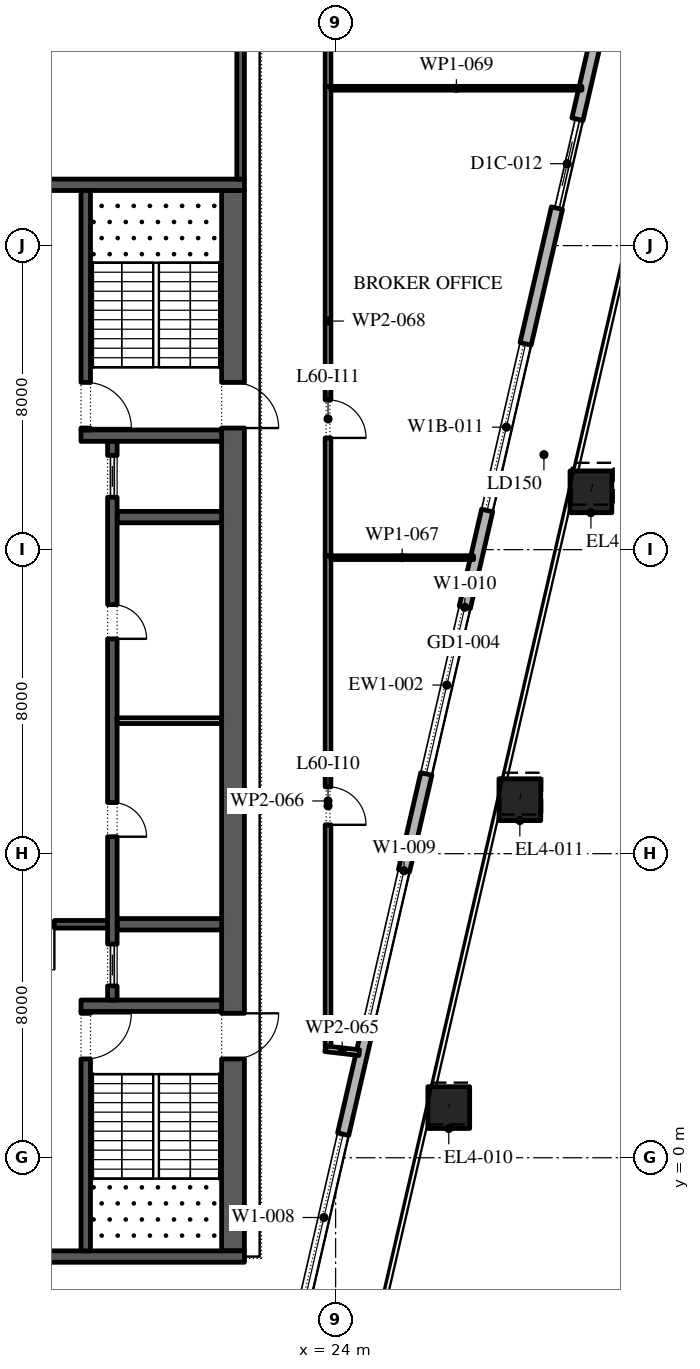
"""IFC4 building model, lengths in metres.
Left out: names, types, materials, properties, quantities, classifications, styles, units other than length and angle.
Written with IfcOpenShell. Run it as: python <this file> out.ifc"""

import sys

from ifc_helpers import new_model, si_unit, direction, frame, frame_2d, origin, origin_2d, place, context, subcontext, project, spatial, rectangle, extrude, element, fill, save


model = new_model("IFC4")
c1 = context("Model", 3, precision=1e-05, world=origin(), true_north=direction((0.0, 1.0)))
c2 = subcontext(c1, "Body", "Model", "MODEL_VIEW")
j1 = project(units=[si_unit("LENGTHUNIT", "METRE"), si_unit("PLANEANGLEUNIT", "RADIAN")], contexts=[c1])
p1 = place(None, origin())
s1 = spatial("IfcSite", under=j1, at=p1, CompositionType="ELEMENT")
p2 = place(p1, origin())
s2 = spatial("IfcBuilding", under=s1, at=p2, CompositionType="ELEMENT")
p3 = place(p2, frame((0.0, 0.0, 276.6)))
s3 = spatial("IfcBuildingStorey", under=s2, at=p3, CompositionType="ELEMENT", Elevation=276.6)
p4 = place(p3, frame((26.977, 1.32, 0.0), z_axis=(0.005810983994, 0.025277780376, 0.999663576552), x_axis=(-0.974579651079, 0.224041299099, 0.0)))
e1 = element("IfcColumn", 1, at=p4, inside=s3, PredefinedType="COLUMN", context=c2, shape_type="SweptSolid", body=[
    extrude(rectangle(XDim=1.1, YDim=1.1, at=origin_2d()), origin(), (0.0, 0.0, 1.0), 4.201),
])
p5 = place(p3, frame((28.847, 9.421, 0.0), z_axis=(0.008770884695, 0.037929719907, 0.99924191662), x_axis=(-0.974290512438, 0.225295355862, 0.0)))
e2 = element("IfcColumn", 2, at=p5, inside=s3, PredefinedType="COLUMN", context=c2, shape_type="SweptSolid", body=[
    extrude(rectangle(XDim=1.1, YDim=1.1, at=origin_2d()), origin(), (0.0, 0.0, 1.0), 4.203),
])
p6 = place(p3, frame((30.717, 17.522, 0.0), z_axis=(0.011668267153, 0.050562490995, 0.998652735462), x_axis=(-0.974391195695, 0.224859506699, 0.0)))
e3 = element("IfcColumn", 3, at=p6, inside=s3, PredefinedType="COLUMN", context=c2, shape_type="SweptSolid", body=[
    extrude(rectangle(XDim=1.1, YDim=1.1, at=origin_2d()), origin(), (0.0, 0.0, 1.0), 4.206),
])
p7 = place(p3, frame((21.359, -11.678, 0.0), z_axis=(0.0, 0.0, 1.0), x_axis=(0.224949198343, 0.974370493275, 0.0)))
e4 = element("IfcWall", 4, at=p7, inside=s3, PredefinedType="STANDARD", context=c2, shape_type="SweptSolid", body=[
    extrude(rectangle(XDim=49.5, YDim=0.3, at=frame_2d((24.75, 0.0))), origin(), (0.0, 0.0, 1.0), 4.0),
])
p8 = place(p7, frame((1.157, 0.0, 0.45)))
e5 = element("IfcOpeningElement", 5, at=p8, cuts=e4, PredefinedType="OPENING", context=c2, shape_type="SweptSolid", body=[
    extrude(rectangle(XDim=4.5, YDim=3.05, at=frame_2d((2.25, 1.525))), frame((0.0, 0.16, 0.0), z_axis=(0.0, -1.0, 0.0), x_axis=(1.0, 0.0, 0.0)), (0.0, 0.0, 1.0), 0.32),
])
p9 = place(p7, frame((8.121, 0.0, 0.45)))
e6 = element("IfcOpeningElement", 6, at=p9, cuts=e4, PredefinedType="OPENING", context=c2, shape_type="SweptSolid", body=[
    extrude(rectangle(XDim=4.5, YDim=3.05, at=frame_2d((2.25, 1.525))), frame((0.0, 0.16, 0.0), z_axis=(0.0, -1.0, 0.0), x_axis=(1.0, 0.0, 0.0)), (0.0, 0.0, 1.0), 0.32),
])
p10 = place(p7, frame((15.236, 0.0, 0.45)))
e7 = element("IfcOpeningElement", 7, at=p10, cuts=e4, PredefinedType="OPENING", context=c2, shape_type="SweptSolid", body=[
    extrude(rectangle(XDim=4.5, YDim=3.05, at=frame_2d((2.25, 1.525))), frame((0.0, 0.16, 0.0), z_axis=(0.0, -1.0, 0.0), x_axis=(1.0, 0.0, 0.0)), (0.0, 0.0, 1.0), 0.32),
])
p11 = place(p7, frame((22.35, 0.0, 0.45)))
e8 = element("IfcOpeningElement", 8, at=p11, cuts=e4, PredefinedType="OPENING", context=c2, shape_type="SweptSolid", body=[
    extrude(rectangle(XDim=4.5, YDim=3.05, at=frame_2d((2.25, 1.525))), frame((0.0, 0.16, 0.0), z_axis=(0.0, -1.0, 0.0), x_axis=(1.0, 0.0, 0.0)), (0.0, 0.0, 1.0), 0.32),
])
p12 = place(p7, frame((29.464, 0.0, 0.45)))
e9 = element("IfcOpeningElement", 9, at=p12, cuts=e4, PredefinedType="OPENING", context=c2, shape_type="SweptSolid", body=[
    extrude(rectangle(XDim=4.5, YDim=2.95, at=frame_2d((2.25, 1.475))), frame((0.0, 0.16, 0.0), z_axis=(0.0, -1.0, 0.0), x_axis=(1.0, 0.0, 0.0)), (0.0, 0.0, 1.0), 0.32),
])
p13 = place(p7, frame((37.628, 0.0, 0.0)))
e10 = element("IfcOpeningElement", 10, at=p13, cuts=e4, PredefinedType="OPENING", context=c2, shape_type="SweptSolid", body=[
    extrude(rectangle(XDim=2.4, YDim=3.325, at=frame_2d((1.2, 1.663))), frame((0.0, 0.16, 0.0), z_axis=(0.0, -1.0, 0.0), x_axis=(1.0, 0.0, 0.0)), (0.0, 0.0, 1.0), 0.32),
])
p14 = place(p7, frame((43.693, 0.0, 0.45)))
e11 = element("IfcOpeningElement", 11, at=p14, cuts=e4, PredefinedType="OPENING", context=c2, shape_type="SweptSolid", body=[
    extrude(rectangle(XDim=4.5, YDim=3.05, at=frame_2d((2.25, 1.525))), frame((0.0, 0.16, 0.0), z_axis=(0.0, -1.0, 0.0), x_axis=(1.0, 0.0, 0.0)), (0.0, 0.0, 1.0), 0.32),
])
p15 = place(p3, frame((21.3, -2.45, 0.0), z_axis=(0.0, 0.0, 1.0), x_axis=(0.0, 1.0, 0.0)))
e12 = element("IfcWall", 12, at=p15, inside=s3, PredefinedType="SHEAR", context=c2, shape_type="SweptSolid", body=[
    extrude(rectangle(XDim=27.9, YDim=0.6, at=frame_2d((13.95, 0.0))), origin(), (0.0, 0.0, 1.0), 4.0),
])
p16 = place(p15, frame((5.05, 0.0, 0.0)))
e13 = element("IfcOpeningElement", 13, at=p16, cuts=e12, PredefinedType="OPENING", context=c2, shape_type="SweptSolid", body=[
    extrude(rectangle(XDim=1.2, YDim=2.1, at=frame_2d((0.6, 1.05))), frame((0.0, 0.31, 0.0), z_axis=(0.0, -1.0, 0.0), x_axis=(1.0, 0.0, 0.0)), (0.0, 0.0, 1.0), 0.62),
])
p17 = place(p15, frame((21.65, 0.0, 0.0)))
e14 = element("IfcOpeningElement", 14, at=p17, cuts=e12, PredefinedType="OPENING", context=c2, shape_type="SweptSolid", body=[
    extrude(rectangle(XDim=1.2, YDim=2.1, at=frame_2d((0.6, 1.05))), frame((0.0, 0.31, 0.0), z_axis=(0.0, -1.0, 0.0), x_axis=(1.0, 0.0, 0.0)), (0.0, 0.0, 1.0), 0.62),
])
for number, where, z_axis, x_axis in (
    (15, (10.4, -2.6, 0.0), (0.0, 0.0, 1.0), (1.0, 0.0, 0.0)),
    (16, (10.4, 25.6, 0.0), (0.0, 0.0, 1.0), (1.0, 0.0, 0.0)),
):
    element("IfcWall", number, at=place(p3, frame(where, z_axis=z_axis, x_axis=x_axis)), inside=s3, PredefinedType="SHEAR", context=c2, shape_type="SweptSolid", body=[
        extrude(rectangle(XDim=11.2, YDim=0.3, at=frame_2d((5.6, 0.0))), origin(), (0.0, 0.0, 1.0), 4.0),
    ])
p18 = place(p3, frame((17.3, 4.0, 0.0), z_axis=(0.0, 0.0, 1.0), x_axis=(1.0, 0.0, 0.0)))
e17 = element("IfcWall", 17, at=p18, inside=s3, PredefinedType="SHEAR", context=c2, shape_type="SweptSolid", body=[
    extrude(rectangle(XDim=3.7, YDim=0.3, at=frame_2d((1.85, 0.0))), origin(), (0.0, 0.0, 1.0), 4.0),
])
p19 = place(p3, frame((17.425, -2.45, 0.0), z_axis=(0.0, 0.0, 1.0), x_axis=(0.0, 1.0, 0.0)))
e18 = element("IfcWall", 18, at=p19, inside=s3, PredefinedType="SHEAR", context=c2, shape_type="SweptSolid", body=[
    extrude(rectangle(XDim=6.3, YDim=0.25, at=frame_2d((3.15, 0.0))), origin(), (0.0, 0.0, 1.0), 4.0),
])
p20 = place(p19, frame((5.05, 0.0, 0.0)))
e19 = element("IfcOpeningElement", 19, at=p20, cuts=e18, PredefinedType="OPENING", context=c2, shape_type="SweptSolid", body=[
    extrude(rectangle(XDim=1.2, YDim=2.1, at=frame_2d((0.6, 1.05))), frame((0.0, 0.135, 0.0), z_axis=(0.0, -1.0, 0.0), x_axis=(1.0, 0.0, 0.0)), (0.0, 0.0, 1.0), 0.27),
])
p21 = place(p3, frame((17.3, 19.0, 0.0), z_axis=(0.0, 0.0, 1.0), x_axis=(1.0, 0.0, 0.0)))
e20 = element("IfcWall", 20, at=p21, inside=s3, PredefinedType="SHEAR", context=c2, shape_type="SweptSolid", body=[
    extrude(rectangle(XDim=3.7, YDim=0.3, at=frame_2d((1.85, 0.0))), origin(), (0.0, 0.0, 1.0), 4.0),
])
p22 = place(p3, frame((17.425, 19.15, 0.0), z_axis=(0.0, 0.0, 1.0), x_axis=(0.0, 1.0, 0.0)))
e21 = element("IfcWall", 21, at=p22, inside=s3, PredefinedType="SHEAR", context=c2, shape_type="SweptSolid", body=[
    extrude(rectangle(XDim=6.3, YDim=0.25, at=frame_2d((3.15, 0.0))), origin(), (0.0, 0.0, 1.0), 4.0),
])
p23 = place(p22, frame((0.05, 0.0, 0.0)))
e22 = element("IfcOpeningElement", 22, at=p23, cuts=e21, PredefinedType="OPENING", context=c2, shape_type="SweptSolid", body=[
    extrude(rectangle(XDim=1.2, YDim=2.1, at=frame_2d((0.6, 1.05))), frame((0.0, 0.135, 0.0), z_axis=(0.0, -1.0, 0.0), x_axis=(1.0, 0.0, 0.0)), (0.0, 0.0, 1.0), 0.27),
])
for number, where, z_axis, x_axis in (
    (23, (18.25, 6.143, 0.0), (0.0, 0.0, 1.0), (1.0, 0.0, 0.0)),
    (24, (18.25, 16.857, 0.0), (0.0, 0.0, 1.0), (1.0, 0.0, 0.0)),
):
    element("IfcWall", number, at=place(p3, frame(where, z_axis=z_axis, x_axis=x_axis)), inside=s3, PredefinedType="SHEAR", context=c2, shape_type="SweptSolid", body=[
        extrude(rectangle(XDim=2.75, YDim=0.3, at=frame_2d((1.375, 0.0))), origin(), (0.0, 0.0, 1.0), 4.0),
    ])
p24 = place(p3, frame((18.125, 4.15, 0.0), z_axis=(0.0, 0.0, 1.0), x_axis=(0.0, 1.0, 0.0)))
e25 = element("IfcWall", 25, at=p24, inside=s3, PredefinedType="SHEAR", context=c2, shape_type="SweptSolid", body=[
    extrude(rectangle(XDim=14.7, YDim=0.25, at=frame_2d((7.35, 0.0))), origin(), (0.0, 0.0, 1.0), 4.0),
])
p25 = place(p24, frame((4.296, 0.0, 0.0)))
e26 = element("IfcOpeningElement", 26, at=p25, cuts=e25, PredefinedType="OPENING", context=c2, shape_type="SweptSolid", body=[
    extrude(rectangle(XDim=0.9, YDim=2.1, at=frame_2d((0.45, 1.05))), frame((0.0, 0.135, 0.0), z_axis=(0.0, -1.0, 0.0), x_axis=(1.0, 0.0, 0.0)), (0.0, 0.0, 1.0), 0.27),
])
p26 = place(p24, frame((9.504, 0.0, 0.0)))
e27 = element("IfcOpeningElement", 27, at=p26, cuts=e25, PredefinedType="OPENING", context=c2, shape_type="SweptSolid", body=[
    extrude(rectangle(XDim=0.9, YDim=2.1, at=frame_2d((0.45, 1.05))), frame((0.0, 0.135, 0.0), z_axis=(0.0, -1.0, 0.0), x_axis=(1.0, 0.0, 0.0)), (0.0, 0.0, 1.0), 0.27),
])
p27 = place(p24, frame((0.371, 0.0, 0.0)))
e28 = element("IfcOpeningElement", 28, at=p27, cuts=e25, PredefinedType="OPENING", context=c2, shape_type="SweptSolid", body=[
    extrude(rectangle(XDim=1.1, YDim=2.1, at=frame_2d((0.55, 1.05))), frame((0.0, 0.135, 0.0), z_axis=(0.0, -1.0, 0.0), x_axis=(1.0, 0.0, 0.0)), (0.0, 0.0, 1.0), 0.27),
])
p28 = place(p24, frame((13.229, 0.0, 0.0)))
e29 = element("IfcOpeningElement", 29, at=p28, cuts=e25, PredefinedType="OPENING", context=c2, shape_type="SweptSolid", body=[
    extrude(rectangle(XDim=1.1, YDim=2.1, at=frame_2d((0.55, 1.05))), frame((0.0, 0.135, 0.0), z_axis=(0.0, -1.0, 0.0), x_axis=(1.0, 0.0, 0.0)), (0.0, 0.0, 1.0), 0.27),
])
p29 = place(p3, frame((18.25, 11.5, 0.0), z_axis=(0.0, 0.0, 1.0), x_axis=(1.0, 0.0, 0.0)))
e30 = element("IfcWall", 30, at=p29, inside=s3, PredefinedType="PARTITIONING", context=c2, shape_type="SweptSolid", body=[
    extrude(rectangle(XDim=2.75, YDim=0.15, at=frame_2d((1.375, 0.0))), origin(), (0.0, 0.0, 1.0), 4.0),
])
p30 = place(p3, frame((14.0, 6.143, 0.0), z_axis=(0.0, 0.0, 1.0), x_axis=(1.0, 0.0, 0.0)))
e31 = element("IfcWall", 31, at=p30, inside=s3, PredefinedType="SHEAR", context=c2, shape_type="SweptSolid", body=[
    extrude(rectangle(XDim=4.0, YDim=0.2, at=frame_2d((2.0, 0.0))), origin(), (0.0, 0.0, 1.0), 4.0),
])
p31 = place(p30, frame((1.4, 0.0, 0.0)))
e32 = element("IfcOpeningElement", 32, at=p31, cuts=e31, PredefinedType="OPENING", context=c2, shape_type="SweptSolid", body=[
    extrude(rectangle(XDim=1.2, YDim=2.1, at=frame_2d((0.6, 1.05))), frame((0.0, 0.11, 0.0), z_axis=(0.0, -1.0, 0.0), x_axis=(1.0, 0.0, 0.0)), (0.0, 0.0, 1.0), 0.22),
])
p32 = place(p3, frame((21.5, 25.75, 0.0), z_axis=(0.0, 0.0, 1.0), x_axis=(0.0, 1.0, 0.0)))
e33 = element("IfcWall", 33, at=p32, inside=s3, PredefinedType="SHEAR", context=c2, shape_type="SweptSolid", body=[
    extrude(rectangle(XDim=4.75, YDim=0.2, at=frame_2d((2.375, 0.0))), origin(), (0.0, 0.0, 1.0), 4.0),
])
p33 = place(p3, frame((23.725, 2.869, 0.0), z_axis=(0.0, 0.0, 1.0), x_axis=(0.993330469257, -0.115302119865, 0.0)))
e34 = element("IfcWall", 34, at=p33, inside=s3, PredefinedType="PARTITIONING", context=c2, shape_type="SweptSolid", body=[
    extrude(rectangle(XDim=0.902, YDim=0.15, at=frame_2d((0.451, 0.0))), origin(), (0.0, 0.0, 1.0), 4.0),
])
p34 = place(p3, frame((23.8, 15.84, 0.0), z_axis=(0.0, 0.0, 1.0), x_axis=(0.0, -1.0, 0.0)))
e35 = element("IfcWall", 35, at=p34, inside=s3, PredefinedType="PARTITIONING", context=c2, shape_type="SweptSolid", body=[
    extrude(rectangle(XDim=12.905, YDim=0.15, at=frame_2d((6.453, 0.0))), origin(), (0.0, 0.0, 1.0), 4.0),
])
p35 = place(p34, frame((6.08, 0.0, 0.0)))
e36 = element("IfcOpeningElement", 36, at=p35, cuts=e35, PredefinedType="OPENING", context=c2, shape_type="SweptSolid", body=[
    extrude(rectangle(XDim=1.0, YDim=2.1, at=frame_2d((0.5, 1.05))), frame((0.0, 0.085, 0.0), z_axis=(0.0, -1.0, 0.0), x_axis=(1.0, 0.0, 0.0)), (0.0, 0.0, 1.0), 0.17),
])
p36 = place(p3, frame((23.875, 15.79, 0.0), z_axis=(0.0, 0.0, 1.0), x_axis=(1.0, 0.0, 0.0)))
e37 = element("IfcWall", 37, at=p36, inside=s3, PredefinedType="PARTITIONING", context=c2, shape_type="SweptSolid", body=[
    extrude(rectangle(XDim=3.754, YDim=0.1, at=frame_2d((1.877, 0.0))), origin(), (0.0, 0.0, 1.0), 4.0),
])
p37 = place(p3, frame((23.8, 28.19, 0.0), z_axis=(0.0, 0.0, 1.0), x_axis=(0.0, -1.0, 0.0)))
e38 = element("IfcWall", 38, at=p37, inside=s3, PredefinedType="PARTITIONING", context=c2, shape_type="SweptSolid", body=[
    extrude(rectangle(XDim=12.35, YDim=0.15, at=frame_2d((6.175, 0.0))), origin(), (0.0, 0.0, 1.0), 4.0),
])
p38 = place(p37, frame((8.25, 0.0, 0.0)))
e39 = element("IfcOpeningElement", 39, at=p38, cuts=e38, PredefinedType="OPENING", context=c2, shape_type="SweptSolid", body=[
    extrude(rectangle(XDim=1.0, YDim=2.1, at=frame_2d((0.5, 1.05))), frame((0.0, 0.085, 0.0), z_axis=(0.0, -1.0, 0.0), x_axis=(1.0, 0.0, 0.0)), (0.0, 0.0, 1.0), 0.17),
])
p39 = place(p3, frame((23.875, 28.14, 0.0), z_axis=(0.0, 0.0, 1.0), x_axis=(1.0, 0.0, 0.0)))
e40 = element("IfcWall", 40, at=p39, inside=s3, PredefinedType="PARTITIONING", context=c2, shape_type="SweptSolid", body=[
    extrude(rectangle(XDim=6.605, YDim=0.1, at=frame_2d((3.302, 0.0))), origin(), (0.0, 0.0, 1.0), 4.0),
])
p40 = place(p3, frame((23.8, 32.425, 0.0), z_axis=(0.0, 0.0, 1.0), x_axis=(0.0, -1.0, 0.0)))
e41 = element("IfcWall", 41, at=p40, inside=s3, PredefinedType="PARTITIONING", context=c2, shape_type="SweptSolid", body=[
    extrude(rectangle(XDim=4.235, YDim=0.15, at=frame_2d((2.118, 0.0))), origin(), (0.0, 0.0, 1.0), 4.0),
])
p41 = place(p40, frame((1.635, 0.0, 0.0)))
e42 = element("IfcOpeningElement", 42, at=p41, cuts=e41, PredefinedType="OPENING", context=c2, shape_type="SweptSolid", body=[
    extrude(rectangle(XDim=1.0, YDim=2.1, at=frame_2d((0.5, 1.05))), frame((0.0, 0.085, 0.0), z_axis=(0.0, -1.0, 0.0), x_axis=(1.0, 0.0, 0.0)), (0.0, 0.0, 1.0), 0.17),
])
p42 = place(p9, origin())
e43 = element("IfcWindow", 43, at=p42, inside=s3, PartitioningType="DOUBLE_PANEL_VERTICAL", PredefinedType="WINDOW", context=c2, shape_type="SweptSolid", body=[
    extrude(rectangle(XDim=4.5, YDim=3.05, at=frame_2d((2.25, 1.525))), frame((0.0, 0.03, 0.0), z_axis=(0.0, -1.0, 0.0), x_axis=(1.0, 0.0, 0.0)), (0.0, 0.0, 1.0), 0.06),
])
fill(e6, e43)
p43 = place(p10, origin())
e44 = element("IfcWindow", 44, at=p43, inside=s3, PartitioningType="DOUBLE_PANEL_VERTICAL", PredefinedType="WINDOW", context=c2, shape_type="SweptSolid", body=[
    extrude(rectangle(XDim=4.5, YDim=3.05, at=frame_2d((2.25, 1.525))), frame((0.0, 0.03, 0.0), z_axis=(0.0, -1.0, 0.0), x_axis=(1.0, 0.0, 0.0)), (0.0, 0.0, 1.0), 0.06),
])
fill(e7, e44)
p44 = place(p11, origin())
e45 = element("IfcWindow", 45, at=p44, inside=s3, PartitioningType="DOUBLE_PANEL_VERTICAL", PredefinedType="WINDOW", context=c2, shape_type="SweptSolid", body=[
    extrude(rectangle(XDim=4.5, YDim=3.05, at=frame_2d((2.25, 1.525))), frame((0.0, 0.03, 0.0), z_axis=(0.0, -1.0, 0.0), x_axis=(1.0, 0.0, 0.0)), (0.0, 0.0, 1.0), 0.06),
])
fill(e8, e45)
p45 = place(p12, origin())
e46 = element("IfcWindow", 46, at=p45, inside=s3, PartitioningType="DOUBLE_PANEL_VERTICAL", PredefinedType="WINDOW", context=c2, shape_type="SweptSolid", body=[
    extrude(rectangle(XDim=4.5, YDim=2.95, at=frame_2d((2.25, 1.475))), frame((0.0, 0.03, 0.0), z_axis=(0.0, -1.0, 0.0), x_axis=(1.0, 0.0, 0.0)), (0.0, 0.0, 1.0), 0.06),
])
fill(e9, e46)
p46 = place(p13, origin())
e47 = element("IfcDoor", 47, at=p46, inside=s3, OperationType="DOUBLE_DOOR_SLIDING", PredefinedType="DOOR", context=c2, shape_type="SweptSolid", body=[
    extrude(rectangle(XDim=2.4, YDim=3.325, at=frame_2d((1.2, 1.663))), frame((0.0, 0.025, 0.0), z_axis=(0.0, -1.0, 0.0), x_axis=(1.0, 0.0, 0.0)), (0.0, 0.0, 1.0), 0.05),
])
fill(e10, e47)
p47 = place(p25, frame((0.9, -0.2, 0.0), z_axis=(0.0, 0.0, 1.0), x_axis=(-1.0, 0.0, 0.0)))
e48 = element("IfcDoor", 48, at=p47, inside=s3, OperationType="SINGLE_SWING_LEFT", PredefinedType="DOOR", context=c2, shape_type="SweptSolid", body=[
    extrude(rectangle(XDim=0.9, YDim=2.1, at=frame_2d((0.45, 1.05))), frame((0.0, -0.075, 0.0), z_axis=(0.0, -1.0, 0.0), x_axis=(1.0, 0.0, 0.0)), (0.0, 0.0, 1.0), 0.05),
])
fill(e26, e48)
p48 = place(p26, frame((0.9, -0.2, 0.0), z_axis=(0.0, 0.0, 1.0), x_axis=(-1.0, 0.0, 0.0)))
e49 = element("IfcDoor", 49, at=p48, inside=s3, OperationType="SINGLE_SWING_LEFT", PredefinedType="DOOR", context=c2, shape_type="SweptSolid", body=[
    extrude(rectangle(XDim=0.9, YDim=2.1, at=frame_2d((0.45, 1.05))), frame((0.0, -0.075, 0.0), z_axis=(0.0, -1.0, 0.0), x_axis=(1.0, 0.0, 0.0)), (0.0, 0.0, 1.0), 0.05),
])
fill(e27, e49)
p49 = place(p27, origin())
e50 = element("IfcDoor", 50, at=p49, inside=s3, OperationType="SLIDING_TO_LEFT", PredefinedType="DOOR", context=c2, shape_type="SweptSolid", body=[
    extrude(rectangle(XDim=1.1, YDim=2.1, at=frame_2d((0.55, 1.05))), frame((0.0, 0.025, 0.0), z_axis=(0.0, -1.0, 0.0), x_axis=(1.0, 0.0, 0.0)), (0.0, 0.0, 1.0), 0.05),
])
fill(e28, e50)
p50 = place(p28, origin())
e51 = element("IfcDoor", 51, at=p50, inside=s3, OperationType="SLIDING_TO_LEFT", PredefinedType="DOOR", context=c2, shape_type="SweptSolid", body=[
    extrude(rectangle(XDim=1.1, YDim=2.1, at=frame_2d((0.55, 1.05))), frame((0.0, 0.025, 0.0), z_axis=(0.0, -1.0, 0.0), x_axis=(1.0, 0.0, 0.0)), (0.0, 0.0, 1.0), 0.05),
])
fill(e29, e51)
p51 = place(p31, frame((1.2, 0.0, 0.0), z_axis=(0.0, 0.0, 1.0), x_axis=(-1.0, 0.0, 0.0)))
e52 = element("IfcDoor", 52, at=p51, inside=s3, OperationType="SINGLE_SWING_RIGHT", PredefinedType="DOOR", context=c2, shape_type="SweptSolid", body=[
    extrude(rectangle(XDim=1.2, YDim=2.1, at=frame_2d((0.6, 1.05))), frame((0.0, 0.025, 0.0), z_axis=(0.0, -1.0, 0.0), x_axis=(1.0, 0.0, 0.0)), (0.0, 0.0, 1.0), 0.05),
])
fill(e32, e52)
p52 = place(p20, frame((1.2, 0.0, 0.0), z_axis=(0.0, 0.0, 1.0), x_axis=(-1.0, 0.0, 0.0)))
e53 = element("IfcDoor", 53, at=p52, inside=s3, OperationType="SINGLE_SWING_RIGHT", PredefinedType="DOOR", context=c2, shape_type="SweptSolid", body=[
    extrude(rectangle(XDim=1.2, YDim=2.1, at=frame_2d((0.6, 1.05))), frame((0.0, 0.025, 0.0), z_axis=(0.0, -1.0, 0.0), x_axis=(1.0, 0.0, 0.0)), (0.0, 0.0, 1.0), 0.05),
])
fill(e19, e53)
p53 = place(p16, frame((1.2, 0.0, 0.0), z_axis=(0.0, 0.0, 1.0), x_axis=(-1.0, 0.0, 0.0)))
e54 = element("IfcDoor", 54, at=p53, inside=s3, OperationType="SINGLE_SWING_RIGHT", PredefinedType="DOOR", context=c2, shape_type="SweptSolid", body=[
    extrude(rectangle(XDim=1.2, YDim=2.1, at=frame_2d((0.6, 1.05))), frame((0.0, 0.025, 0.0), z_axis=(0.0, -1.0, 0.0), x_axis=(1.0, 0.0, 0.0)), (0.0, 0.0, 1.0), 0.05),
])
fill(e13, e54)
p54 = place(p23, frame((1.2, 0.0, 0.0), z_axis=(0.0, 0.0, 1.0), x_axis=(-1.0, 0.0, 0.0)))
e55 = element("IfcDoor", 55, at=p54, inside=s3, OperationType="SINGLE_SWING_LEFT", PredefinedType="DOOR", context=c2, shape_type="SweptSolid", body=[
    extrude(rectangle(XDim=1.2, YDim=2.1, at=frame_2d((0.6, 1.05))), frame((0.0, 0.025, 0.0), z_axis=(0.0, -1.0, 0.0), x_axis=(1.0, 0.0, 0.0)), (0.0, 0.0, 1.0), 0.05),
])
fill(e22, e55)
p55 = place(p17, frame((1.2, 0.0, 0.0), z_axis=(0.0, 0.0, 1.0), x_axis=(-1.0, 0.0, 0.0)))
e56 = element("IfcDoor", 56, at=p55, inside=s3, OperationType="SINGLE_SWING_LEFT", PredefinedType="DOOR", context=c2, shape_type="SweptSolid", body=[
    extrude(rectangle(XDim=1.2, YDim=2.1, at=frame_2d((0.6, 1.05))), frame((0.0, 0.025, 0.0), z_axis=(0.0, -1.0, 0.0), x_axis=(1.0, 0.0, 0.0)), (0.0, 0.0, 1.0), 0.05),
])
fill(e14, e56)
p56 = place(p35, origin())
e57 = element("IfcDoor", 57, at=p56, inside=s3, OperationType="SINGLE_SWING_LEFT", PredefinedType="DOOR", context=c2, shape_type="SweptSolid", body=[
    extrude(rectangle(XDim=1.0, YDim=2.1, at=frame_2d((0.5, 1.05))), frame((0.0, 0.025, 0.0), z_axis=(0.0, -1.0, 0.0), x_axis=(1.0, 0.0, 0.0)), (0.0, 0.0, 1.0), 0.05),
])
fill(e36, e57)
p57 = place(p38, origin())
e58 = element("IfcDoor", 58, at=p57, inside=s3, OperationType="SINGLE_SWING_LEFT", PredefinedType="DOOR", context=c2, shape_type="SweptSolid", body=[
    extrude(rectangle(XDim=1.0, YDim=2.1, at=frame_2d((0.5, 1.05))), frame((0.0, 0.025, 0.0), z_axis=(0.0, -1.0, 0.0), x_axis=(1.0, 0.0, 0.0)), (0.0, 0.0, 1.0), 0.05),
])
fill(e39, e58)
save(model, sys.argv[1])
